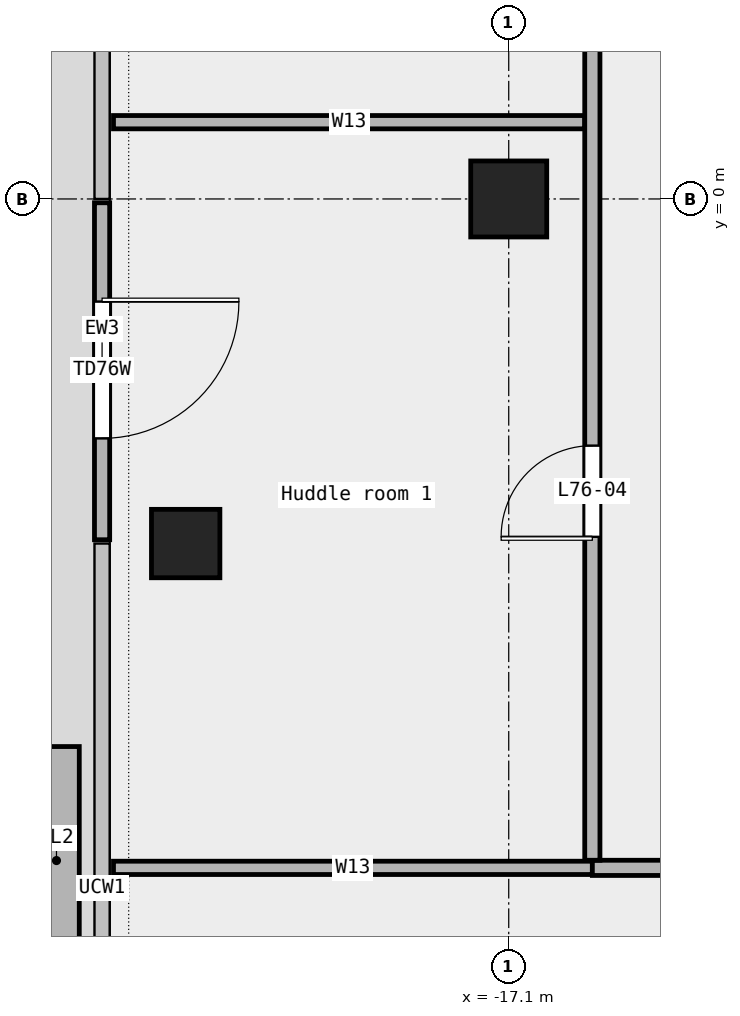
"""IFC4 building model, lengths in metres.
Left out: names, types, materials, properties, quantities, classifications, styles, units other than length and angle.
Written with IfcOpenShell. Run it as: python <this file> out.ifc"""

import sys

from ifc_helpers import new_model, si_unit, direction, frame, frame_2d, origin, origin_2d, place, context, subcontext, project, spatial, rectangle, extrude, element, fill, save


model = new_model("IFC4")
c1 = context("Model", 3, precision=1e-05, world=origin(), true_north=direction((0.0, 1.0)))
c2 = subcontext(c1, "Body", "Model", "MODEL_VIEW")
j1 = project(units=[si_unit("LENGTHUNIT", "METRE"), si_unit("PLANEANGLEUNIT", "RADIAN")], contexts=[c1])
p1 = place(None, origin())
s1 = spatial("IfcSite", under=j1, at=p1, CompositionType="ELEMENT")
p2 = place(p1, origin())
s2 = spatial("IfcBuilding", under=s1, at=p2, CompositionType="ELEMENT")
p3 = place(p2, frame((0.0, 0.0, 349.4)))
s3 = spatial("IfcBuildingStorey", under=s2, at=p3, CompositionType="ELEMENT", Elevation=349.4)
p4 = place(p3, frame((-21.35, -4.533, 0.0), z_axis=(0.0, 0.0, 1.0), x_axis=(1.0, 0.0, 0.0)))
e1 = element("IfcColumn", 1, at=p4, inside=s3, PredefinedType="COLUMN", context=c2, shape_type="SweptSolid", body=[
    extrude(rectangle(XDim=0.9, YDim=0.9, at=origin_2d()), origin(), (0.0, 0.0, 1.0), 3.65),
])
p5 = place(p3, frame((-17.1, 0.0, 0.0), z_axis=(0.0, 0.0, 1.0), x_axis=(1.0, 0.0, 0.0)))
e2 = element("IfcColumn", 2, at=p5, inside=s3, PredefinedType="COLUMN", context=c2, shape_type="SweptSolid", body=[
    extrude(rectangle(XDim=1.0, YDim=1.0, at=origin_2d()), origin(), (0.0, 0.0, 1.0), 3.65),
])
p6 = place(p3, frame((-22.45, -0.05, 0.0), z_axis=(0.0, 0.0, 1.0), x_axis=(0.0, -1.0, 0.0)))
e3 = element("IfcWall", 3, at=p6, inside=s3, PredefinedType="STANDARD", context=c2, shape_type="SweptSolid", body=[
    extrude(rectangle(XDim=4.433, YDim=0.2, at=frame_2d((2.217, 0.0))), origin(), (0.0, 0.0, 1.0), 3.65),
])
p7 = place(p6, frame((1.3, 0.0, 0.0)))
e4 = element("IfcOpeningElement", 4, at=p7, cuts=e3, PredefinedType="OPENING", context=c2, shape_type="SweptSolid", body=[
    extrude(rectangle(XDim=1.8, YDim=2.4, at=frame_2d((0.9, 1.2))), frame((0.0, 0.112, 0.0), z_axis=(0.0, -1.0, 0.0), x_axis=(1.0, 0.0, 0.0)), (0.0, 0.0, 1.0), 0.224),
])
p8 = place(p3, frame((-23.05, -7.204, 0.0), z_axis=(0.0, 0.0, 1.0), x_axis=(0.0, -1.0, 0.0)))
e5 = element("IfcWall", 5, at=p8, inside=s3, PredefinedType="STANDARD", context=c2, shape_type="SweptSolid", body=[
    extrude(rectangle(XDim=3.0, YDim=0.6, at=frame_2d((1.5, 0.0))), origin(), (0.0, 0.0, 1.0), 0.7),
])
p9 = place(p3, frame((-22.3, -8.8, 0.0), z_axis=(0.0, 0.0, 1.0), x_axis=(1.0, 0.0, 0.0)))
e6 = element("IfcWall", 6, at=p9, inside=s3, PredefinedType="PARTITIONING", context=c2, shape_type="SweptSolid", body=[
    extrude(rectangle(XDim=6.3, YDim=0.175, at=frame_2d((3.15, 0.0))), origin(), (0.0, 0.0, 1.0), 3.65),
])
p10 = place(p3, frame((-16.0, -8.8, 0.0), z_axis=(0.0, 0.0, 1.0), x_axis=(1.0, 0.0, 0.0)))
e7 = element("IfcWall", 7, at=p10, inside=s3, PredefinedType="PARTITIONING", context=c2, shape_type="SweptSolid", body=[
    extrude(rectangle(XDim=32.0, YDim=0.2, at=frame_2d((16.0, 0.0))), origin(), (0.0, 0.0, 1.0), 3.65),
])
p11 = place(p10, frame((6.995, 0.0, 0.0)))
e8 = element("IfcOpeningElement", 8, at=p11, cuts=e7, PredefinedType="OPENING", context=c2, shape_type="SweptSolid", body=[
    extrude(rectangle(XDim=1.2, YDim=2.1, at=frame_2d((0.6, 1.05))), frame((0.0, 0.112, 0.0), z_axis=(0.0, -1.0, 0.0), x_axis=(1.0, 0.0, 0.0)), (0.0, 0.0, 1.0), 0.224),
])
p12 = place(p10, frame((22.407, 0.0, 0.0)))
e9 = element("IfcOpeningElement", 9, at=p12, cuts=e7, PredefinedType="OPENING", context=c2, shape_type="SweptSolid", body=[
    extrude(rectangle(XDim=1.5, YDim=2.1, at=frame_2d((0.75, 1.05))), frame((0.0, 0.112, 0.0), z_axis=(0.0, -1.0, 0.0), x_axis=(1.0, 0.0, 0.0)), (0.0, 0.0, 1.0), 0.224),
])
p13 = place(p10, frame((29.63, 0.0, 0.0)))
e10 = element("IfcOpeningElement", 10, at=p13, cuts=e7, PredefinedType="OPENING", context=c2, shape_type="SweptSolid", body=[
    extrude(rectangle(XDim=1.5, YDim=2.1, at=frame_2d((0.75, 1.05))), frame((0.0, 0.112, 0.0), z_axis=(0.0, -1.0, 0.0), x_axis=(1.0, 0.0, 0.0)), (0.0, 0.0, 1.0), 0.224),
])
p14 = place(p10, frame((1.18, 0.0, 0.0)))
e11 = element("IfcOpeningElement", 11, at=p14, cuts=e7, PredefinedType="OPENING", context=c2, shape_type="SweptSolid", body=[
    extrude(rectangle(XDim=1.5, YDim=2.1, at=frame_2d((0.75, 1.05))), frame((0.0, 0.112, 0.0), z_axis=(0.0, -1.0, 0.0), x_axis=(1.0, 0.0, 0.0)), (0.0, 0.0, 1.0), 0.224),
])
p15 = place(p10, frame((13.843, 0.0, 0.0)))
e12 = element("IfcOpeningElement", 12, at=p15, cuts=e7, PredefinedType="OPENING", context=c2, shape_type="SweptSolid", body=[
    extrude(rectangle(XDim=1.2, YDim=2.1, at=frame_2d((0.6, 1.05))), frame((0.0, 0.112, 0.0), z_axis=(0.0, -1.0, 0.0), x_axis=(1.0, 0.0, 0.0)), (0.0, 0.0, 1.0), 0.224),
])
p16 = place(p3, frame((-22.3, 1.01, 0.0), z_axis=(0.0, 0.0, 1.0), x_axis=(1.0, 0.0, 0.0)))
e13 = element("IfcWall", 13, at=p16, inside=s3, PredefinedType="PARTITIONING", context=c2, shape_type="SweptSolid", body=[
    extrude(rectangle(XDim=6.2, YDim=0.175, at=frame_2d((3.1, 0.0))), origin(), (0.0, 0.0, 1.0), 3.65),
])
p17 = place(p3, frame((-16.0, -8.7, 0.0), z_axis=(0.0, 0.0, 1.0), x_axis=(0.0, 1.0, 0.0)))
e14 = element("IfcWall", 14, at=p17, inside=s3, PredefinedType="PARTITIONING", context=c2, shape_type="SweptSolid", body=[
    extrude(rectangle(XDim=23.7, YDim=0.2, at=frame_2d((11.85, 0.0))), origin(), (0.0, 0.0, 1.0), 3.65),
])
p18 = place(p17, frame((4.255, 0.0, 0.0)))
e15 = element("IfcOpeningElement", 15, at=p18, cuts=e14, PredefinedType="OPENING", context=c2, shape_type="SweptSolid", body=[
    extrude(rectangle(XDim=1.2, YDim=2.1, at=frame_2d((0.6, 1.05))), frame((0.0, 0.112, 0.0), z_axis=(0.0, -1.0, 0.0), x_axis=(1.0, 0.0, 0.0)), (0.0, 0.0, 1.0), 0.224),
])
p19 = place(p17, frame((20.265, 0.0, 0.0)))
e16 = element("IfcOpeningElement", 16, at=p19, cuts=e14, PredefinedType="OPENING", context=c2, shape_type="SweptSolid", body=[
    extrude(rectangle(XDim=1.0, YDim=2.1, at=frame_2d((0.5, 1.05))), frame((0.0, 0.112, 0.0), z_axis=(0.0, -1.0, 0.0), x_axis=(1.0, 0.0, 0.0)), (0.0, 0.0, 1.0), 0.224),
])
p20 = place(p17, frame((12.72, 0.0, 0.0)))
e17 = element("IfcOpeningElement", 17, at=p20, cuts=e14, PredefinedType="OPENING", context=c2, shape_type="SweptSolid", body=[
    extrude(rectangle(XDim=0.9, YDim=2.1, at=frame_2d((0.45, 1.05))), frame((0.0, 0.112, 0.0), z_axis=(0.0, -1.0, 0.0), x_axis=(1.0, 0.0, 0.0)), (0.0, 0.0, 1.0), 0.224),
])
p21 = place(p7, origin())
e18 = element("IfcDoor", 18, at=p21, inside=s3, OperationType="DOUBLE_DOOR_SINGLE_SWING", PredefinedType="DOOR", context=c2, shape_type="SweptSolid", body=[
    extrude(rectangle(XDim=1.8, YDim=2.4, at=frame_2d((0.9, 1.2))), frame((0.0, 0.025, 0.0), z_axis=(0.0, -1.0, 0.0), x_axis=(1.0, 0.0, 0.0)), (0.0, 0.0, 1.0), 0.05),
])
fill(e4, e18)
p22 = place(p18, origin())
e19 = element("IfcDoor", 19, at=p22, inside=s3, OperationType="SINGLE_SWING_LEFT", PredefinedType="DOOR", context=c2, shape_type="SweptSolid", body=[
    extrude(rectangle(XDim=1.2, YDim=2.1, at=frame_2d((0.6, 1.05))), frame((0.0, 0.025, 0.0), z_axis=(0.0, -1.0, 0.0), x_axis=(1.0, 0.0, 0.0)), (0.0, 0.0, 1.0), 0.05),
])
fill(e15, e19)
save(model, sys.argv[1])
